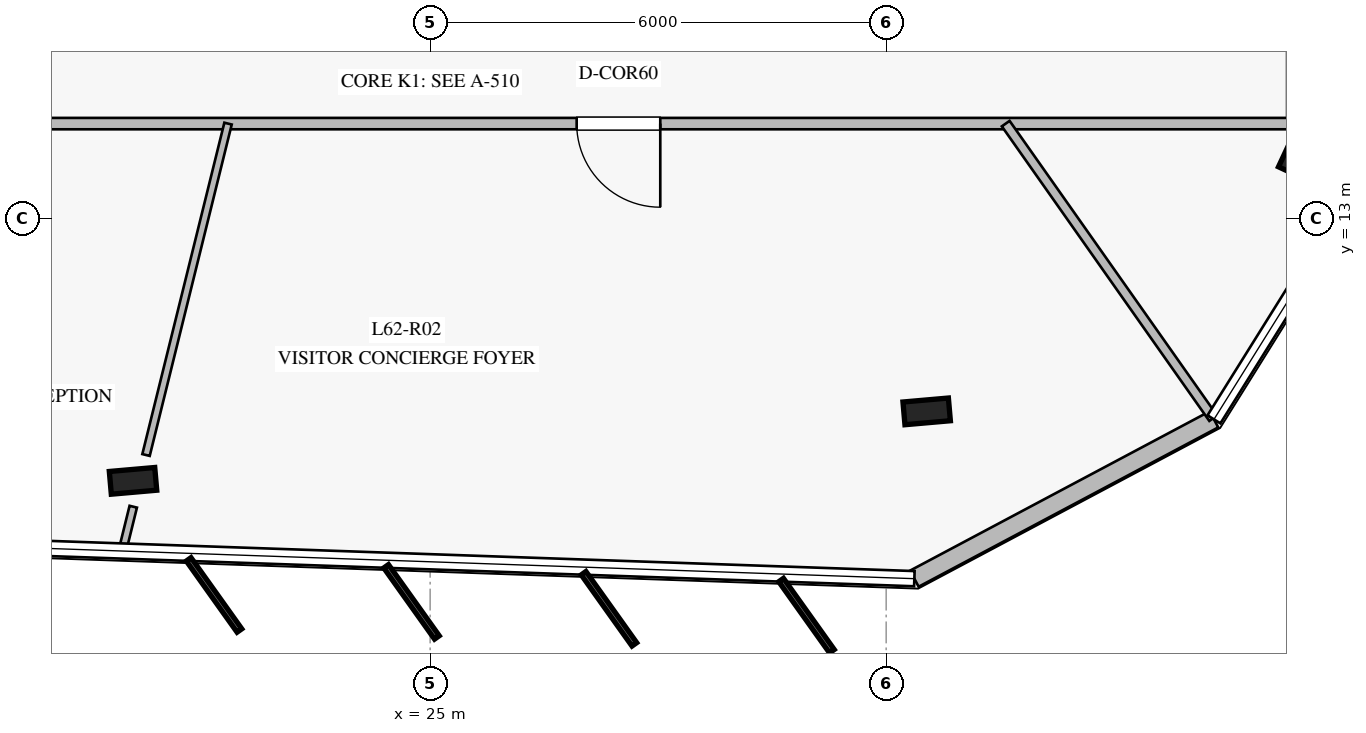
"""IFC4 building model, lengths in metres.
Left out: names, types, materials, properties, quantities, classifications, styles, units other than length and angle.
Written with IfcOpenShell. Run it as: python <this file> out.ifc"""

import sys

from ifc_helpers import new_model, si_unit, direction, frame, frame_2d, origin, origin_2d, place, context, subcontext, project, spatial, rectangle, i_section, extrude, element, fill, save


model = new_model("IFC4")
c1 = context("Model", 3, precision=1e-05, world=origin(), true_north=direction((0.0, 1.0)))
c2 = subcontext(c1, "Body", "Model", "MODEL_VIEW")
j1 = project(units=[si_unit("LENGTHUNIT", "METRE"), si_unit("PLANEANGLEUNIT", "RADIAN")], contexts=[c1])
p1 = place(None, origin())
s1 = spatial("IfcSite", under=j1, at=p1, CompositionType="ELEMENT")
p2 = place(p1, origin())
s2 = spatial("IfcBuilding", under=s1, at=p2, CompositionType="ELEMENT")
p3 = place(p2, frame((0.0, 0.0, 258.2)))
s3 = spatial("IfcBuildingStorey", under=s2, at=p3, CompositionType="ELEMENT", Elevation=258.2)
for number, where, z_axis, x_axis in (
    (1, (21.091, 9.55, 0.0), (0.0, 0.0, 1.0), (0.996, 0.087, 0.0)),
    (2, (31.533, 10.464, 0.0), (0.0, 0.0, 1.0), (0.996, 0.087, 0.0)),
    (3, (36.425, 13.89, 0.0), (0.0, 0.0, 1.0), (0.423, 0.906, 0.0)),
):
    element("IfcColumn", number, at=place(p3, frame(where, z_axis=z_axis, x_axis=x_axis)), inside=s3, PredefinedType="COLUMN", context=c2, shape_type="SweptSolid", body=[
        extrude(i_section(OverallWidth=0.3, OverallDepth=0.6, WebThickness=0.015, FlangeThickness=0.03, at=origin_2d()), origin(), (0.0, 0.0, 1.0), 4.0),
    ])
p4 = place(p3, frame((31.371, 8.263, 0.0), z_axis=(0.0, 0.0, 1.0), x_axis=(0.88294715046, 0.469472394816, 0.0)))
e4 = element("IfcWall", 4, at=p4, inside=s3, PredefinedType="STANDARD", context=c2, shape_type="SweptSolid", body=[
    extrude(rectangle(XDim=4.464, YDim=0.24, at=frame_2d((2.232, 0.0))), origin(), (0.0, 0.0, 1.0), 3.78),
])
p5 = place(p3, frame((36.35, 14.25, 0.0), z_axis=(0.0, 0.0, 1.0), x_axis=(-1.0, 0.0, 0.0)))
e5 = element("IfcWall", 5, at=p5, inside=s3, PredefinedType="PARTITIONING", context=c2, shape_type="SweptSolid", body=[
    extrude(rectangle(XDim=22.7, YDim=0.15, at=frame_2d((11.35, 0.0))), origin(), (0.0, 0.0, 1.0), 3.28),
])
p6 = place(p5, frame((17.718, 0.0, 0.0)))
e6 = element("IfcOpeningElement", 6, at=p6, cuts=e5, PredefinedType="OPENING", context=c2, shape_type="SweptSolid", body=[
    extrude(rectangle(XDim=1.1, YDim=2.2, at=frame_2d((0.55, 1.1))), frame((0.0, 0.085, 0.0), z_axis=(0.0, -1.0, 0.0), x_axis=(1.0, 0.0, 0.0)), (0.0, 0.0, 1.0), 0.17),
])
p7 = place(p5, frame((8.322, 0.0, 0.0)))
e7 = element("IfcOpeningElement", 7, at=p7, cuts=e5, PredefinedType="OPENING", context=c2, shape_type="SweptSolid", body=[
    extrude(rectangle(XDim=1.1, YDim=2.2, at=frame_2d((0.55, 1.1))), frame((0.0, 0.085, 0.0), z_axis=(0.0, -1.0, 0.0), x_axis=(1.0, 0.0, 0.0)), (0.0, 0.0, 1.0), 0.17),
])
p8 = place(p3, frame((22.341, 14.25, 0.0), z_axis=(0.0, 0.0, 1.0), x_axis=(-0.240245677683, -0.970712117136, 0.0)))
e8 = element("IfcWall", 8, at=p8, inside=s3, PredefinedType="MOVABLE", context=c2, shape_type="SweptSolid", body=[
    extrude(rectangle(XDim=4.492, YDim=0.1, at=frame_2d((2.246, 0.0))), origin(), (0.0, 0.0, 1.0), 3.42),
])
p9 = place(p3, frame((21.094, 9.21, 0.0), z_axis=(0.0, 0.0, 1.0), x_axis=(-0.239583063614, -0.970875870351, 0.0)))
e9 = element("IfcWall", 9, at=p9, inside=s3, PredefinedType="MOVABLE", context=c2, shape_type="SweptSolid", body=[
    extrude(rectangle(XDim=0.584, YDim=0.1, at=frame_2d((0.292, 0.0))), origin(), (0.0, 0.0, 1.0), 3.78),
])
p10 = place(p3, frame((32.573, 14.25, 0.0), z_axis=(0.0, 0.0, 1.0), x_axis=(0.575837769847, -0.817563980871, 0.0)))
e10 = element("IfcWall", 10, at=p10, inside=s3, PredefinedType="PARTITIONING", context=c2, shape_type="SweptSolid", body=[
    extrude(rectangle(XDim=4.741, YDim=0.125, at=frame_2d((2.371, 0.0))), origin(), (0.0, 0.0, 1.0), 3.28),
])
p11 = place(p7, origin())
e11 = element("IfcDoor", 11, at=p11, inside=s3, OperationType="SINGLE_SWING_LEFT", PredefinedType="DOOR", context=c2, shape_type="SweptSolid", body=[
    extrude(rectangle(XDim=1.1, YDim=2.2, at=frame_2d((0.55, 1.1))), frame((0.0, 0.025, 0.0), z_axis=(0.0, -1.0, 0.0), x_axis=(1.0, 0.0, 0.0)), (0.0, 0.0, 1.0), 0.05),
])
fill(e7, e11)
save(model, sys.argv[1])
